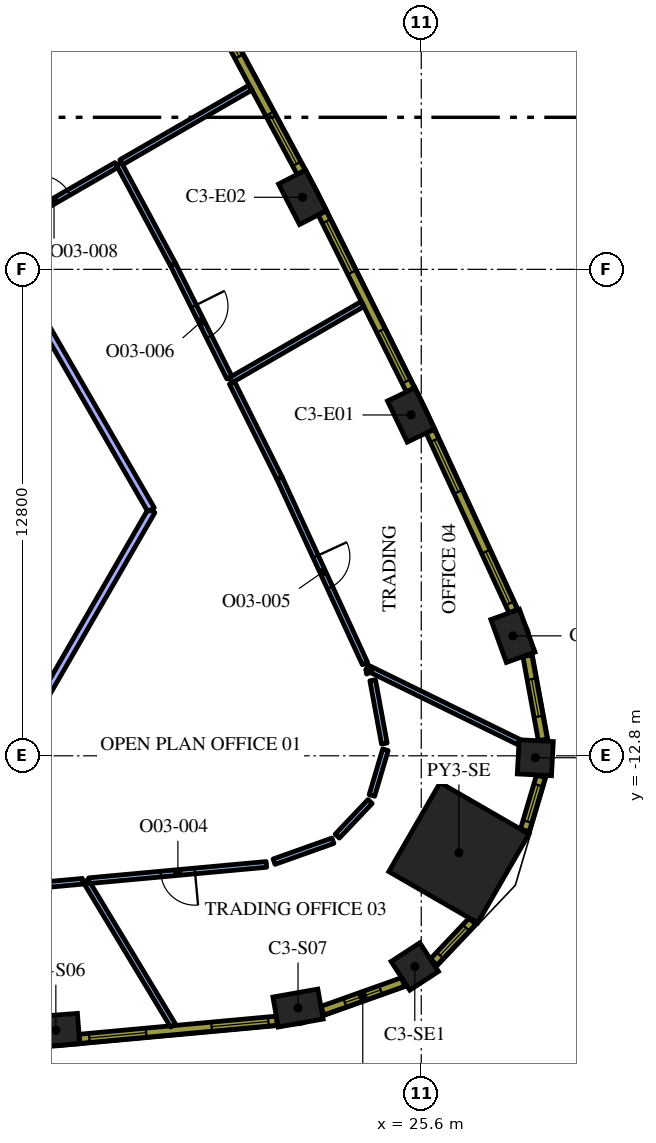
"""IFC4 building model, lengths in metres.
Left out: names, types, materials, properties, quantities, classifications, styles, units other than length and angle.
Written with IfcOpenShell. Run it as: python <this file> out.ifc"""

import sys

from ifc_helpers import new_model, si_unit, direction, frame, frame_2d, origin, origin_2d, place, context, subcontext, project, spatial, rectangle, extrude, element, fill, save


model = new_model("IFC4")
c1 = context("Model", 3, precision=1e-05, world=origin(), true_north=direction((0.0, 1.0)))
c2 = subcontext(c1, "Body", "Model", "MODEL_VIEW")
j1 = project(units=[si_unit("LENGTHUNIT", "METRE"), si_unit("PLANEANGLEUNIT", "RADIAN")], contexts=[c1])
p1 = place(None, origin())
s1 = spatial("IfcSite", under=j1, at=p1, CompositionType="ELEMENT")
p2 = place(p1, origin())
s2 = spatial("IfcBuilding", under=s1, at=p2, CompositionType="ELEMENT")
p3 = place(p2, frame((0.0, 0.0, 166.8)))
s3 = spatial("IfcBuildingStorey", under=s2, at=p3, CompositionType="ELEMENT", Elevation=166.8)
p4 = place(p3, frame((26.591, -15.352, 0.0), z_axis=(0.0, 0.0, 1.0), x_axis=(0.866025403784, -0.5, 0.0)))
e1 = element("IfcColumn", 1, at=p4, inside=s3, PredefinedType="COLUMN", context=c2, shape_type="SweptSolid", body=[
    extrude(rectangle(XDim=2.7, YDim=2.7, at=origin_2d()), origin(), (0.0, 0.0, 1.0), 4.2),
])
for number, where, z_axis, x_axis in (
    (2, (15.985, -20.022, 0.0), (0.0, 0.0, 1.0), (0.997, 0.076, 0.0)),
    (3, (22.357, -19.437, 0.0), (0.0, 0.0, 1.0), (0.985, 0.175, 0.0)),
):
    element("IfcColumn", number, at=place(p3, frame(where, z_axis=z_axis, x_axis=x_axis)), inside=s3, PredefinedType="COLUMN", context=c2, shape_type="SweptSolid", body=[
        extrude(rectangle(XDim=1.2, YDim=0.8, at=origin_2d()), origin(), (0.0, 0.0, 1.0), 4.2),
    ])
for number, where, z_axis, x_axis in (
    (4, (25.43, -18.344, 0.0), (0.0, 0.0, 1.0), (0.838, 0.546, 0.0)),
    (5, (28.601, -12.851, 0.0), (0.0, 0.0, 1.0), (0.053, 0.999, 0.0)),
):
    element("IfcColumn", number, at=place(p3, frame(where, z_axis=z_axis, x_axis=x_axis)), inside=s3, PredefinedType="COLUMN", context=c2, shape_type="SweptSolid", body=[
        extrude(rectangle(XDim=0.9, YDim=0.9, at=origin_2d()), origin(), (0.0, 0.0, 1.0), 4.2),
    ])
for number, where, z_axis, x_axis in (
    (6, (28.012, -9.644, 0.0), (0.0, 0.0, 1.0), (-0.341, 0.94, 0.0)),
    (7, (25.332, -3.832, 0.0), (0.0, 0.0, 1.0), (-0.433, 0.902, 0.0)),
    (8, (22.476, 1.896, 0.0), (0.0, 0.0, 1.0), (-0.46, 0.888, 0.0)),
):
    element("IfcColumn", number, at=place(p3, frame(where, z_axis=z_axis, x_axis=x_axis)), inside=s3, PredefinedType="COLUMN", context=c2, shape_type="SweptSolid", body=[
        extrude(rectangle(XDim=1.2, YDim=0.8, at=origin_2d()), origin(), (0.0, 0.0, 1.0), 4.2),
    ])
p5 = place(p3, frame((16.773, -16.094, 0.0), z_axis=(0.0, 0.0, 1.0), x_axis=(0.516844039178, -0.856079575253, 0.0)))
e9 = element("IfcWall", 9, at=p5, inside=s3, PredefinedType="PARTITIONING", context=c2, shape_type="SweptSolid", body=[
    extrude(rectangle(XDim=4.446, YDim=0.15, at=frame_2d((2.223, 0.0))), origin(), (0.0, 0.0, 1.0), 3.15),
])
p6 = place(p3, frame((15.692, -16.193, 0.0), z_axis=(0.0, 0.0, 1.0), x_axis=(0.995818997537, 0.091348366946, 0.0)))
e10 = element("IfcWall", 10, at=p6, inside=s3, PredefinedType="PARTITIONING", context=c2, shape_type="SweptSolid", body=[
    extrude(rectangle(XDim=1.002, YDim=0.15, at=frame_2d((0.501, 0.0))), origin(), (0.0, 0.0, 1.0), 3.15),
])
p7 = place(p3, frame((24.169, -10.48, 0.0), z_axis=(0.0, 0.0, 1.0), x_axis=(0.898142173557, -0.439705169491, 0.0)))
e11 = element("IfcWall", 11, at=p7, inside=s3, PredefinedType="PARTITIONING", context=c2, shape_type="SweptSolid", body=[
    extrude(rectangle(XDim=4.458, YDim=0.15, at=frame_2d((2.229, 0.0))), origin(), (0.0, 0.0, 1.0), 3.15),
])
p8 = place(p3, frame((21.525, -15.657, 0.0), z_axis=(0.0, 0.0, 1.0), x_axis=(-0.99581172086, -0.091427657734, 0.0)))
e12 = element("IfcWall", 12, at=p8, inside=s3, PredefinedType="PARTITIONING", context=c2, shape_type="SweptSolid", body=[
    extrude(rectangle(XDim=4.689, YDim=0.15, at=frame_2d((2.344, 0.0))), origin(), (0.0, 0.0, 1.0), 3.15),
])
p9 = place(p8, frame((1.889, 0.0, 0.0)))
e13 = element("IfcOpeningElement", 13, at=p9, cuts=e12, PredefinedType="OPENING", context=c2, shape_type="SweptSolid", body=[
    extrude(rectangle(XDim=0.9, YDim=2.1, at=frame_2d((0.45, 1.05))), frame((0.0, 0.085, 0.0), z_axis=(0.0, -1.0, 0.0), x_axis=(1.0, 0.0, 0.0)), (0.0, 0.0, 1.0), 0.17),
])
p10 = place(p3, frame((21.727, -15.586, 0.0), z_axis=(0.0, 0.0, 1.0), x_axis=(0.942087520852, 0.335367116835, 0.0)))
e14 = element("IfcWall", 14, at=p10, inside=s3, PredefinedType="PARTITIONING", context=c2, shape_type="SweptSolid", body=[
    extrude(rectangle(XDim=1.644, YDim=0.15, at=frame_2d((0.822, 0.0))), origin(), (0.0, 0.0, 1.0), 3.15),
])
p11 = place(p3, frame((23.389, -14.914, 0.0), z_axis=(0.0, 0.0, 1.0), x_axis=(0.688003360899, 0.725707499886, 0.0)))
e15 = element("IfcWall", 15, at=p11, inside=s3, PredefinedType="PARTITIONING", context=c2, shape_type="SweptSolid", body=[
    extrude(rectangle(XDim=1.256, YDim=0.15, at=frame_2d((0.628, 0.0))), origin(), (0.0, 0.0, 1.0), 3.15),
])
p12 = place(p3, frame((24.301, -13.844, 0.0), z_axis=(0.0, 0.0, 1.0), x_axis=(0.284386145133, 0.958709820778, 0.0)))
e16 = element("IfcWall", 16, at=p12, inside=s3, PredefinedType="PARTITIONING", context=c2, shape_type="SweptSolid", body=[
    extrude(rectangle(XDim=1.256, YDim=0.15, at=frame_2d((0.628, 0.0))), origin(), (0.0, 0.0, 1.0), 3.15),
])
p13 = place(p3, frame((24.628, -12.477, 0.0), z_axis=(0.0, 0.0, 1.0), x_axis=(-0.180725554657, 0.98353356521, 0.0)))
e17 = element("IfcWall", 17, at=p13, inside=s3, PredefinedType="PARTITIONING", context=c2, shape_type="SweptSolid", body=[
    extrude(rectangle(XDim=1.693, YDim=0.15, at=frame_2d((0.846, 0.0))), origin(), (0.0, 0.0, 1.0), 3.15),
])
p14 = place(p3, frame((24.233, -10.618, 0.0), z_axis=(0.0, 0.0, 1.0), x_axis=(-0.423685108901, 0.905809543169, 0.0)))
e18 = element("IfcWall", 18, at=p14, inside=s3, PredefinedType="PARTITIONING", context=c2, shape_type="SweptSolid", body=[
    extrude(rectangle(XDim=0.033, YDim=0.15, at=frame_2d((0.017, 0.0))), origin(), (0.0, 0.0, 1.0), 3.15),
])
p15 = place(p3, frame((20.585, -2.916, 0.0), z_axis=(0.0, 0.0, 1.0), x_axis=(0.866041532296, 0.499972063559, 0.0)))
e19 = element("IfcWall", 19, at=p15, inside=s3, PredefinedType="PARTITIONING", context=c2, shape_type="SweptSolid", body=[
    extrude(rectangle(XDim=4.008, YDim=0.15, at=frame_2d((2.004, 0.0))), origin(), (0.0, 0.0, 1.0), 3.15),
])
p16 = place(p3, frame((21.869, -5.493, 0.0), z_axis=(0.0, 0.0, 1.0), x_axis=(0.4187440514, -0.908104299856, 0.0)))
e20 = element("IfcWall", 20, at=p16, inside=s3, PredefinedType="PARTITIONING", context=c2, shape_type="SweptSolid", body=[
    extrude(rectangle(XDim=5.373, YDim=0.15, at=frame_2d((2.686, 0.0))), origin(), (0.0, 0.0, 1.0), 3.15),
])
p17 = place(p16, frame((2.273, 0.0, 0.0)))
e21 = element("IfcOpeningElement", 21, at=p17, cuts=e20, PredefinedType="OPENING", context=c2, shape_type="SweptSolid", body=[
    extrude(rectangle(XDim=0.9, YDim=2.1, at=frame_2d((0.45, 1.05))), frame((0.0, 0.085, 0.0), z_axis=(0.0, -1.0, 0.0), x_axis=(1.0, 0.0, 0.0)), (0.0, 0.0, 1.0), 0.17),
])
p18 = place(p3, frame((21.869, -5.493, 0.0), z_axis=(0.0, 0.0, 1.0), x_axis=(-0.446168399468, 0.894949026099, 0.0)))
e22 = element("IfcWall", 22, at=p18, inside=s3, PredefinedType="PARTITIONING", context=c2, shape_type="SweptSolid", body=[
    extrude(rectangle(XDim=2.804, YDim=0.15, at=frame_2d((1.402, 0.0))), origin(), (0.0, 0.0, 1.0), 3.15),
])
p19 = place(p3, frame((19.066, 0.129, 0.0), z_axis=(0.0, 0.0, 1.0), x_axis=(0.446215695511, -0.894925445543, 0.0)))
e23 = element("IfcWall", 23, at=p19, inside=s3, PredefinedType="PARTITIONING", context=c2, shape_type="SweptSolid", body=[
    extrude(rectangle(XDim=3.328, YDim=0.15, at=frame_2d((1.664, 0.0))), origin(), (0.0, 0.0, 1.0), 3.15),
])
p20 = place(p19, frame((1.228, 0.0, 0.0)))
e24 = element("IfcOpeningElement", 24, at=p20, cuts=e23, PredefinedType="OPENING", context=c2, shape_type="SweptSolid", body=[
    extrude(rectangle(XDim=0.9, YDim=2.1, at=frame_2d((0.45, 1.05))), frame((0.0, 0.085, 0.0), z_axis=(0.0, -1.0, 0.0), x_axis=(1.0, 0.0, 0.0)), (0.0, 0.0, 1.0), 0.17),
])
p21 = place(p3, frame((19.066, 0.129, 0.0), z_axis=(0.0, 0.0, 1.0), x_axis=(-0.473359743891, 0.88086920304, 0.0)))
e25 = element("IfcWall", 25, at=p21, inside=s3, PredefinedType="PARTITIONING", context=c2, shape_type="SweptSolid", body=[
    extrude(rectangle(XDim=3.01, YDim=0.15, at=frame_2d((1.505, 0.0))), origin(), (0.0, 0.0, 1.0), 3.15),
])
p22 = place(p3, frame((17.706, 2.819, 0.0), z_axis=(0.0, 0.0, 1.0), x_axis=(0.866023031919, 0.500004108169, 0.0)))
e26 = element("IfcWall", 26, at=p22, inside=s3, PredefinedType="PARTITIONING", context=c2, shape_type="SweptSolid", body=[
    extrude(rectangle(XDim=3.927, YDim=0.15, at=frame_2d((1.963, 0.0))), origin(), (0.0, 0.0, 1.0), 3.15),
])
p23 = place(p3, frame((14.334, 0.872, 0.0), z_axis=(0.0, 0.0, 1.0), x_axis=(0.866027010039, 0.499997217876, 0.0)))
e27 = element("IfcWall", 27, at=p23, inside=s3, PredefinedType="PARTITIONING", context=c2, shape_type="SweptSolid", body=[
    extrude(rectangle(XDim=3.743, YDim=0.15, at=frame_2d((1.872, 0.0))), origin(), (0.0, 0.0, 1.0), 3.15),
])
p24 = place(p23, frame((1.4, 0.0, 0.0)))
e28 = element("IfcOpeningElement", 28, at=p24, cuts=e27, PredefinedType="OPENING", context=c2, shape_type="SweptSolid", body=[
    extrude(rectangle(XDim=0.9, YDim=2.1, at=frame_2d((0.45, 1.05))), frame((0.0, 0.085, 0.0), z_axis=(0.0, -1.0, 0.0), x_axis=(1.0, 0.0, 0.0)), (0.0, 0.0, 1.0), 0.17),
])
p25 = place(p3, frame((14.766, -12.824, 0.0), z_axis=(0.0, 0.0, 1.0), x_axis=(0.500009869004, 0.866019705837, 0.0)))
e29 = element("IfcWall", 29, at=p25, inside=s3, PredefinedType="PARTITIONING", context=c2, shape_type="SweptSolid", body=[
    extrude(rectangle(XDim=7.475, YDim=0.2, at=frame_2d((3.738, 0.0))), origin(), (0.0, 0.0, 1.0), 3.15),
])
p26 = place(p3, frame((18.489, -6.324, 0.0), z_axis=(0.0, 0.0, 1.0), x_axis=(-0.500003913404, 0.866023144368, 0.0)))
e30 = element("IfcWall", 30, at=p26, inside=s3, PredefinedType="PARTITIONING", context=c2, shape_type="SweptSolid", body=[
    extrude(rectangle(XDim=8.234, YDim=0.2, at=frame_2d((4.117, 0.0))), origin(), (0.0, 0.0, 1.0), 3.15),
])
p27 = place(p3, frame((16.606, -20.247, 0.0), z_axis=(0.0, 0.0, 1.0), x_axis=(0.995808712151, 0.091460422067, 0.0)))
e31 = element("IfcWall", 31, at=p27, inside=s3, PredefinedType="SOLIDWALL", context=c2, shape_type="SweptSolid", body=[
    extrude(rectangle(XDim=5.213, YDim=0.24, at=frame_2d((2.606, 0.0))), origin(), (0.0, 0.0, 1.0), 3.95),
])
p28 = place(p27, frame((0.261, 0.0, 0.9)))
e32 = element("IfcOpeningElement", 32, at=p28, cuts=e31, PredefinedType="OPENING", context=c2, shape_type="SweptSolid", body=[
    extrude(rectangle(XDim=1.5, YDim=2.55, at=frame_2d((0.75, 1.275))), frame((0.0, 0.13, 0.0), z_axis=(0.0, -1.0, 0.0), x_axis=(1.0, 0.0, 0.0)), (0.0, 0.0, 1.0), 0.26),
])
p29 = place(p27, frame((3.492, 0.0, 0.9)))
e33 = element("IfcOpeningElement", 33, at=p29, cuts=e31, PredefinedType="OPENING", context=c2, shape_type="SweptSolid", body=[
    extrude(rectangle(XDim=1.5, YDim=2.55, at=frame_2d((0.75, 1.275))), frame((0.0, 0.13, 0.0), z_axis=(0.0, -1.0, 0.0), x_axis=(1.0, 0.0, 0.0)), (0.0, 0.0, 1.0), 0.26),
])
p30 = place(p3, frame((23.001, -19.505, 0.0), z_axis=(0.0, 0.0, 1.0), x_axis=(0.942099727267, 0.335332825539, 0.0)))
e34 = element("IfcWall", 34, at=p30, inside=s3, PredefinedType="SOLIDWALL", context=c2, shape_type="SweptSolid", body=[
    extrude(rectangle(XDim=2.25, YDim=0.24, at=frame_2d((1.125, 0.0))), origin(), (0.0, 0.0, 1.0), 3.95),
])
p31 = place(p30, frame((0.625, 0.0, 0.9)))
e35 = element("IfcOpeningElement", 35, at=p31, cuts=e34, PredefinedType="OPENING", context=c2, shape_type="SweptSolid", body=[
    extrude(rectangle(XDim=1.0, YDim=2.55, at=frame_2d((0.5, 1.275))), frame((0.0, 0.13, 0.0), z_axis=(0.0, -1.0, 0.0), x_axis=(1.0, 0.0, 0.0)), (0.0, 0.0, 1.0), 0.26),
])
p32 = place(p3, frame((25.927, -18.226, 0.0), z_axis=(0.0, 0.0, 1.0), x_axis=(0.687986858937, 0.725723144133, 0.0)))
e36 = element("IfcWall", 36, at=p32, inside=s3, PredefinedType="SOLIDWALL", context=c2, shape_type="SweptSolid", body=[
    extrude(rectangle(XDim=1.481, YDim=0.24, at=frame_2d((0.741, 0.0))), origin(), (0.0, 0.0, 1.0), 3.95),
])
p33 = place(p32, frame((0.241, 0.0, 0.9)))
e37 = element("IfcOpeningElement", 37, at=p33, cuts=e36, PredefinedType="OPENING", context=c2, shape_type="SweptSolid", body=[
    extrude(rectangle(XDim=1.0, YDim=2.55, at=frame_2d((0.5, 1.275))), frame((0.0, 0.13, 0.0), z_axis=(0.0, -1.0, 0.0), x_axis=(1.0, 0.0, 0.0)), (0.0, 0.0, 1.0), 0.26),
])
p34 = place(p3, frame((28.326, -14.76, 0.0), z_axis=(0.0, 0.0, 1.0), x_axis=(0.284413721403, 0.958701640281, 0.0)))
e38 = element("IfcWall", 38, at=p34, inside=s3, PredefinedType="SOLIDWALL", context=c2, shape_type="SweptSolid", body=[
    extrude(rectangle(XDim=1.482, YDim=0.24, at=frame_2d((0.741, 0.0))), origin(), (0.0, 0.0, 1.0), 3.95),
])
p35 = place(p34, frame((0.241, 0.0, 0.9)))
e39 = element("IfcOpeningElement", 39, at=p35, cuts=e38, PredefinedType="OPENING", context=c2, shape_type="SweptSolid", body=[
    extrude(rectangle(XDim=1.0, YDim=2.55, at=frame_2d((0.5, 1.275))), frame((0.0, 0.13, 0.0), z_axis=(0.0, -1.0, 0.0), x_axis=(1.0, 0.0, 0.0)), (0.0, 0.0, 1.0), 0.26),
])
p36 = place(p3, frame((28.799, -12.38, 0.0), z_axis=(0.0, 0.0, 1.0), x_axis=(-0.180737189259, 0.983531427265, 0.0)))
e40 = element("IfcWall", 40, at=p36, inside=s3, PredefinedType="SOLIDWALL", context=c2, shape_type="SweptSolid", body=[
    extrude(rectangle(XDim=2.25, YDim=0.24, at=frame_2d((1.125, 0.0))), origin(), (0.0, 0.0, 1.0), 3.95),
])
p37 = place(p36, frame((0.625, 0.0, 0.9)))
e41 = element("IfcOpeningElement", 41, at=p37, cuts=e40, PredefinedType="OPENING", context=c2, shape_type="SweptSolid", body=[
    extrude(rectangle(XDim=1.0, YDim=2.55, at=frame_2d((0.5, 1.275))), frame((0.0, 0.13, 0.0), z_axis=(0.0, -1.0, 0.0), x_axis=(1.0, 0.0, 0.0)), (0.0, 0.0, 1.0), 0.26),
])
p38 = place(p3, frame((28.02, -8.992, 0.0), z_axis=(0.0, 0.0, 1.0), x_axis=(-0.418722559465, 0.908114209885, 0.0)))
e42 = element("IfcWall", 42, at=p38, inside=s3, PredefinedType="SOLIDWALL", context=c2, shape_type="SweptSolid", body=[
    extrude(rectangle(XDim=5.213, YDim=0.24, at=frame_2d((2.606, 0.0))), origin(), (0.0, 0.0, 1.0), 3.95),
])
p39 = place(p38, frame((0.221, 0.0, 0.9)))
e43 = element("IfcOpeningElement", 43, at=p39, cuts=e42, PredefinedType="OPENING", context=c2, shape_type="SweptSolid", body=[
    extrude(rectangle(XDim=1.5, YDim=2.55, at=frame_2d((0.75, 1.275))), frame((0.0, 0.13, 0.0), z_axis=(0.0, -1.0, 0.0), x_axis=(1.0, 0.0, 0.0)), (0.0, 0.0, 1.0), 0.26),
])
p40 = place(p38, frame((3.452, 0.0, 0.9)))
e44 = element("IfcOpeningElement", 44, at=p40, cuts=e42, PredefinedType="OPENING", context=c2, shape_type="SweptSolid", body=[
    extrude(rectangle(XDim=1.5, YDim=2.55, at=frame_2d((0.75, 1.275))), frame((0.0, 0.13, 0.0), z_axis=(0.0, -1.0, 0.0), x_axis=(1.0, 0.0, 0.0)), (0.0, 0.0, 1.0), 0.26),
])
p41 = place(p3, frame((25.316, -3.171, 0.0), z_axis=(0.0, 0.0, 1.0), x_axis=(-0.446256171312, 0.8949052629, 0.0)))
e45 = element("IfcWall", 45, at=p41, inside=s3, PredefinedType="SOLIDWALL", context=c2, shape_type="SweptSolid", body=[
    extrude(rectangle(XDim=5.203, YDim=0.24, at=frame_2d((2.602, 0.0))), origin(), (0.0, 0.0, 1.0), 3.95),
])
p42 = place(p41, frame((0.248, 0.0, 0.9)))
e46 = element("IfcOpeningElement", 46, at=p42, cuts=e45, PredefinedType="OPENING", context=c2, shape_type="SweptSolid", body=[
    extrude(rectangle(XDim=1.5, YDim=2.55, at=frame_2d((0.75, 1.275))), frame((0.0, 0.13, 0.0), z_axis=(0.0, -1.0, 0.0), x_axis=(1.0, 0.0, 0.0)), (0.0, 0.0, 1.0), 0.26),
])
p43 = place(p41, frame((3.455, 0.0, 0.9)))
e47 = element("IfcOpeningElement", 47, at=p43, cuts=e45, PredefinedType="OPENING", context=c2, shape_type="SweptSolid", body=[
    extrude(rectangle(XDim=1.5, YDim=2.55, at=frame_2d((0.75, 1.275))), frame((0.0, 0.13, 0.0), z_axis=(0.0, -1.0, 0.0), x_axis=(1.0, 0.0, 0.0)), (0.0, 0.0, 1.0), 0.26),
])
p44 = place(p3, frame((22.44, 2.555, 0.0), z_axis=(0.0, 0.0, 1.0), x_axis=(-0.473349833294, 0.880874528704, 0.0)))
e48 = element("IfcWall", 48, at=p44, inside=s3, PredefinedType="SOLIDWALL", context=c2, shape_type="SweptSolid", body=[
    extrude(rectangle(XDim=5.204, YDim=0.24, at=frame_2d((2.602, 0.0))), origin(), (0.0, 0.0, 1.0), 3.95),
])
p45 = place(p44, frame((0.248, 0.0, 0.9)))
e49 = element("IfcOpeningElement", 49, at=p45, cuts=e48, PredefinedType="OPENING", context=c2, shape_type="SweptSolid", body=[
    extrude(rectangle(XDim=1.5, YDim=2.55, at=frame_2d((0.75, 1.275))), frame((0.0, 0.13, 0.0), z_axis=(0.0, -1.0, 0.0), x_axis=(1.0, 0.0, 0.0)), (0.0, 0.0, 1.0), 0.26),
])
p46 = place(p44, frame((3.455, 0.0, 0.9)))
e50 = element("IfcOpeningElement", 50, at=p46, cuts=e48, PredefinedType="OPENING", context=c2, shape_type="SweptSolid", body=[
    extrude(rectangle(XDim=1.5, YDim=2.55, at=frame_2d((0.75, 1.275))), frame((0.0, 0.13, 0.0), z_axis=(0.0, -1.0, 0.0), x_axis=(1.0, 0.0, 0.0)), (0.0, 0.0, 1.0), 0.26),
])
p47 = place(p9, origin())
e51 = element("IfcDoor", 51, at=p47, inside=s3, OperationType="SINGLE_SWING_LEFT", PredefinedType="DOOR", context=c2, shape_type="SweptSolid", body=[
    extrude(rectangle(XDim=0.9, YDim=2.1, at=frame_2d((0.45, 1.05))), frame((0.0, 0.025, 0.0), z_axis=(0.0, -1.0, 0.0), x_axis=(1.0, 0.0, 0.0)), (0.0, 0.0, 1.0), 0.05),
])
fill(e13, e51)
p48 = place(p17, origin())
e52 = element("IfcDoor", 52, at=p48, inside=s3, OperationType="SINGLE_SWING_RIGHT", PredefinedType="DOOR", context=c2, shape_type="SweptSolid", body=[
    extrude(rectangle(XDim=0.9, YDim=2.1, at=frame_2d((0.45, 1.05))), frame((0.0, 0.025, 0.0), z_axis=(0.0, -1.0, 0.0), x_axis=(1.0, 0.0, 0.0)), (0.0, 0.0, 1.0), 0.05),
])
fill(e21, e52)
p49 = place(p20, origin())
e53 = element("IfcDoor", 53, at=p49, inside=s3, OperationType="SINGLE_SWING_RIGHT", PredefinedType="DOOR", context=c2, shape_type="SweptSolid", body=[
    extrude(rectangle(XDim=0.9, YDim=2.1, at=frame_2d((0.45, 1.05))), frame((0.0, 0.025, 0.0), z_axis=(0.0, -1.0, 0.0), x_axis=(1.0, 0.0, 0.0)), (0.0, 0.0, 1.0), 0.05),
])
fill(e24, e53)
p50 = place(p24, origin())
e54 = element("IfcDoor", 54, at=p50, inside=s3, OperationType="SINGLE_SWING_LEFT", PredefinedType="DOOR", context=c2, shape_type="SweptSolid", body=[
    extrude(rectangle(XDim=0.9, YDim=2.1, at=frame_2d((0.45, 1.05))), frame((0.0, 0.025, 0.0), z_axis=(0.0, -1.0, 0.0), x_axis=(1.0, 0.0, 0.0)), (0.0, 0.0, 1.0), 0.05),
])
fill(e28, e54)
p51 = place(p28, origin())
e55 = element("IfcWindow", 55, at=p51, inside=s3, PartitioningType="SINGLE_PANEL", PredefinedType="WINDOW", context=c2, shape_type="SweptSolid", body=[
    extrude(rectangle(XDim=1.5, YDim=2.55, at=frame_2d((0.75, 1.275))), frame((0.0, 0.04, 0.0), z_axis=(0.0, -1.0, 0.0), x_axis=(1.0, 0.0, 0.0)), (0.0, 0.0, 1.0), 0.06),
])
fill(e32, e55)
p52 = place(p29, origin())
e56 = element("IfcWindow", 56, at=p52, inside=s3, PartitioningType="SINGLE_PANEL", PredefinedType="WINDOW", context=c2, shape_type="SweptSolid", body=[
    extrude(rectangle(XDim=1.5, YDim=2.55, at=frame_2d((0.75, 1.275))), frame((0.0, 0.04, 0.0), z_axis=(0.0, -1.0, 0.0), x_axis=(1.0, 0.0, 0.0)), (0.0, 0.0, 1.0), 0.06),
])
fill(e33, e56)
p53 = place(p31, origin())
e57 = element("IfcWindow", 57, at=p53, inside=s3, PartitioningType="SINGLE_PANEL", PredefinedType="WINDOW", context=c2, shape_type="SweptSolid", body=[
    extrude(rectangle(XDim=1.0, YDim=2.55, at=frame_2d((0.5, 1.275))), frame((0.0, 0.04, 0.0), z_axis=(0.0, -1.0, 0.0), x_axis=(1.0, 0.0, 0.0)), (0.0, 0.0, 1.0), 0.06),
])
fill(e35, e57)
p54 = place(p33, origin())
e58 = element("IfcWindow", 58, at=p54, inside=s3, PartitioningType="SINGLE_PANEL", PredefinedType="WINDOW", context=c2, shape_type="SweptSolid", body=[
    extrude(rectangle(XDim=1.0, YDim=2.55, at=frame_2d((0.5, 1.275))), frame((0.0, 0.04, 0.0), z_axis=(0.0, -1.0, 0.0), x_axis=(1.0, 0.0, 0.0)), (0.0, 0.0, 1.0), 0.06),
])
fill(e37, e58)
p55 = place(p35, origin())
e59 = element("IfcWindow", 59, at=p55, inside=s3, PartitioningType="SINGLE_PANEL", PredefinedType="WINDOW", context=c2, shape_type="SweptSolid", body=[
    extrude(rectangle(XDim=1.0, YDim=2.55, at=frame_2d((0.5, 1.275))), frame((0.0, 0.04, 0.0), z_axis=(0.0, -1.0, 0.0), x_axis=(1.0, 0.0, 0.0)), (0.0, 0.0, 1.0), 0.06),
])
fill(e39, e59)
p56 = place(p37, origin())
e60 = element("IfcWindow", 60, at=p56, inside=s3, PartitioningType="SINGLE_PANEL", PredefinedType="WINDOW", context=c2, shape_type="SweptSolid", body=[
    extrude(rectangle(XDim=1.0, YDim=2.55, at=frame_2d((0.5, 1.275))), frame((0.0, 0.04, 0.0), z_axis=(0.0, -1.0, 0.0), x_axis=(1.0, 0.0, 0.0)), (0.0, 0.0, 1.0), 0.06),
])
fill(e41, e60)
p57 = place(p39, origin())
e61 = element("IfcWindow", 61, at=p57, inside=s3, PartitioningType="SINGLE_PANEL", PredefinedType="WINDOW", context=c2, shape_type="SweptSolid", body=[
    extrude(rectangle(XDim=1.5, YDim=2.55, at=frame_2d((0.75, 1.275))), frame((0.0, 0.04, 0.0), z_axis=(0.0, -1.0, 0.0), x_axis=(1.0, 0.0, 0.0)), (0.0, 0.0, 1.0), 0.06),
])
fill(e43, e61)
p58 = place(p40, origin())
e62 = element("IfcWindow", 62, at=p58, inside=s3, PartitioningType="SINGLE_PANEL", PredefinedType="WINDOW", context=c2, shape_type="SweptSolid", body=[
    extrude(rectangle(XDim=1.5, YDim=2.55, at=frame_2d((0.75, 1.275))), frame((0.0, 0.04, 0.0), z_axis=(0.0, -1.0, 0.0), x_axis=(1.0, 0.0, 0.0)), (0.0, 0.0, 1.0), 0.06),
])
fill(e44, e62)
p59 = place(p42, origin())
e63 = element("IfcWindow", 63, at=p59, inside=s3, PartitioningType="SINGLE_PANEL", PredefinedType="WINDOW", context=c2, shape_type="SweptSolid", body=[
    extrude(rectangle(XDim=1.5, YDim=2.55, at=frame_2d((0.75, 1.275))), frame((0.0, 0.04, 0.0), z_axis=(0.0, -1.0, 0.0), x_axis=(1.0, 0.0, 0.0)), (0.0, 0.0, 1.0), 0.06),
])
fill(e46, e63)
p60 = place(p43, origin())
e64 = element("IfcWindow", 64, at=p60, inside=s3, PartitioningType="SINGLE_PANEL", PredefinedType="WINDOW", context=c2, shape_type="SweptSolid", body=[
    extrude(rectangle(XDim=1.5, YDim=2.55, at=frame_2d((0.75, 1.275))), frame((0.0, 0.04, 0.0), z_axis=(0.0, -1.0, 0.0), x_axis=(1.0, 0.0, 0.0)), (0.0, 0.0, 1.0), 0.06),
])
fill(e47, e64)
p61 = place(p45, origin())
e65 = element("IfcWindow", 65, at=p61, inside=s3, PartitioningType="SINGLE_PANEL", PredefinedType="WINDOW", context=c2, shape_type="SweptSolid", body=[
    extrude(rectangle(XDim=1.5, YDim=2.55, at=frame_2d((0.75, 1.275))), frame((0.0, 0.04, 0.0), z_axis=(0.0, -1.0, 0.0), x_axis=(1.0, 0.0, 0.0)), (0.0, 0.0, 1.0), 0.06),
])
fill(e49, e65)
p62 = place(p46, origin())
e66 = element("IfcWindow", 66, at=p62, inside=s3, PartitioningType="SINGLE_PANEL", PredefinedType="WINDOW", context=c2, shape_type="SweptSolid", body=[
    extrude(rectangle(XDim=1.5, YDim=2.55, at=frame_2d((0.75, 1.275))), frame((0.0, 0.04, 0.0), z_axis=(0.0, -1.0, 0.0), x_axis=(1.0, 0.0, 0.0)), (0.0, 0.0, 1.0), 0.06),
])
fill(e50, e66)
save(model, sys.argv[1])
